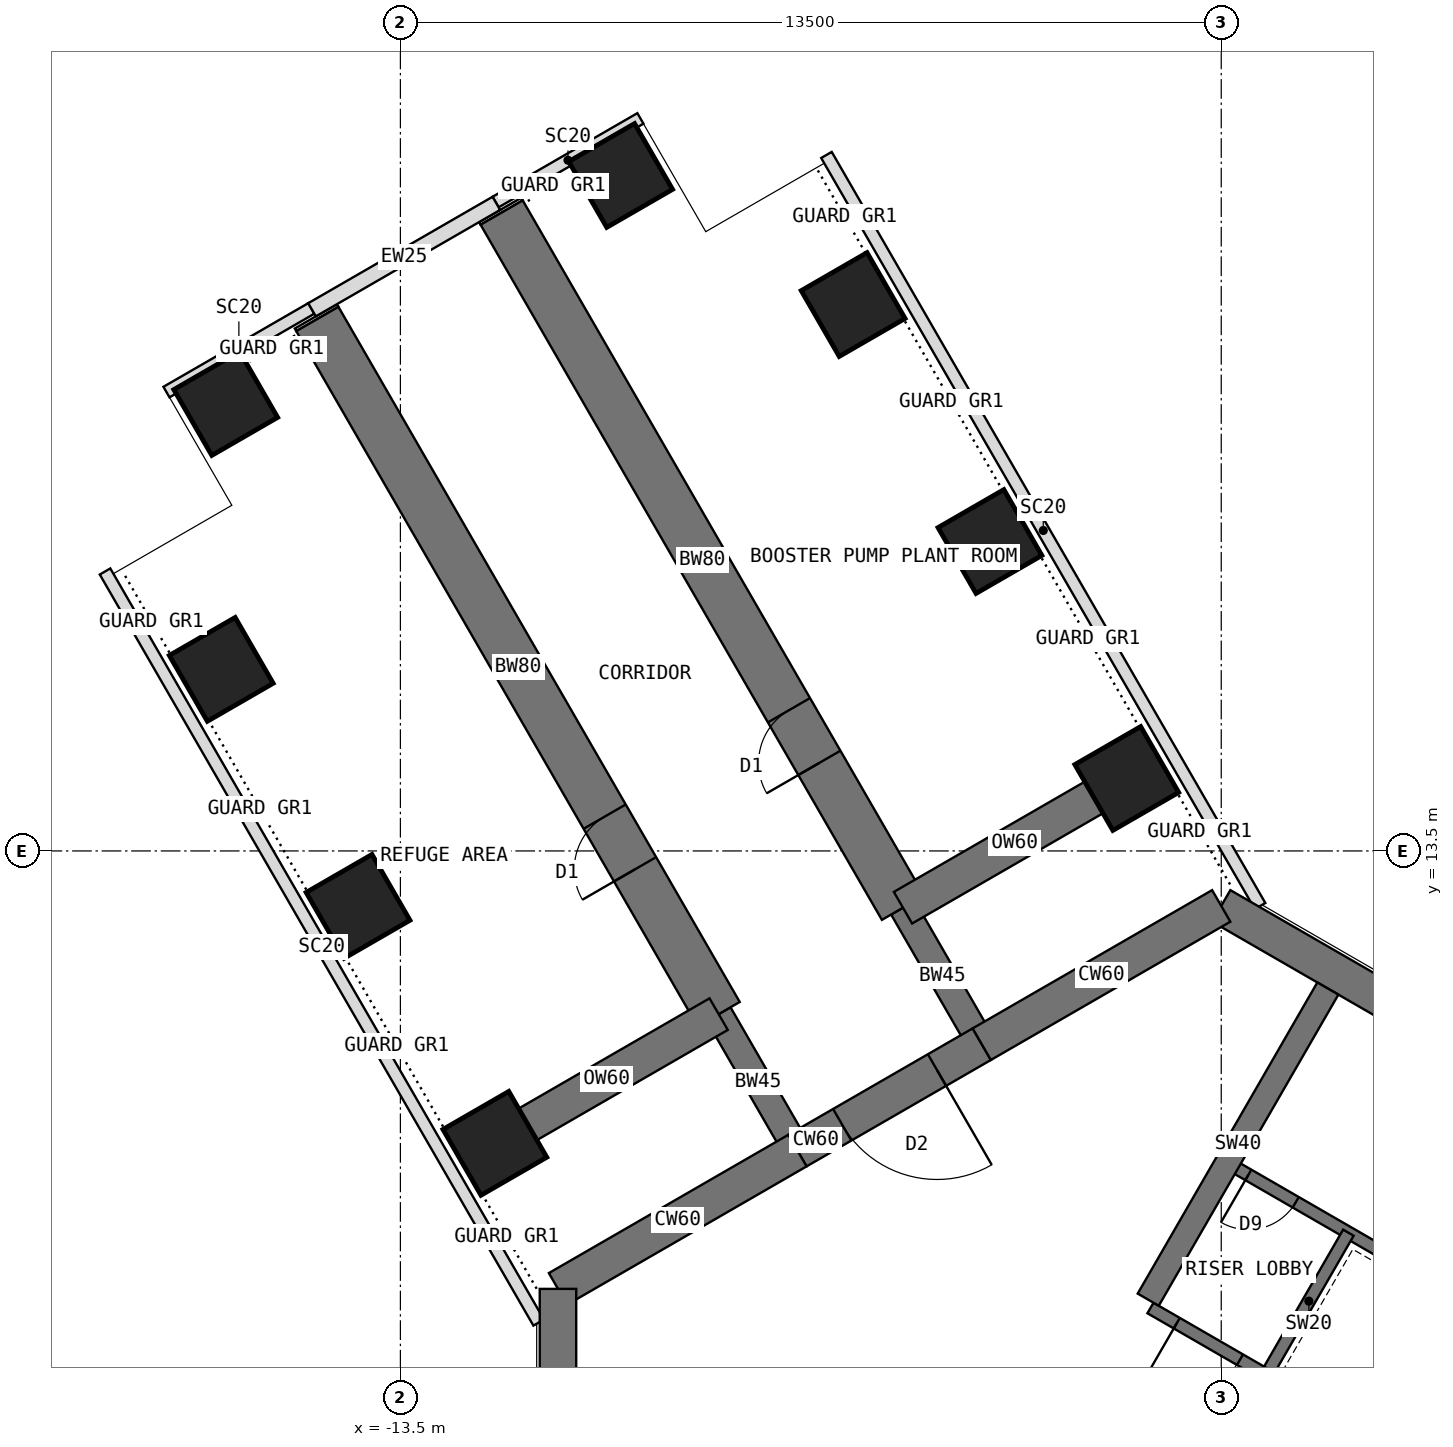
"""IFC4 building model, lengths in metres.
Left out: names, types, materials, properties, quantities, classifications, styles, units other than length and angle.
Written with IfcOpenShell. Run it as: python <this file> out.ifc"""

import sys

from ifc_helpers import new_model, si_unit, direction, frame, frame_2d, origin, origin_2d, place, context, subcontext, project, spatial, rectangle, extrude, element, fill, save


model = new_model("IFC4")
c1 = context("Model", 3, precision=1e-05, world=origin(), true_north=direction((0.0, 1.0)))
c2 = subcontext(c1, "Body", "Model", "MODEL_VIEW")
j1 = project(units=[si_unit("LENGTHUNIT", "METRE"), si_unit("PLANEANGLEUNIT", "RADIAN")], contexts=[c1])
p1 = place(None, origin())
s1 = spatial("IfcSite", under=j1, at=p1, CompositionType="ELEMENT")
p2 = place(p1, origin())
s2 = spatial("IfcBuilding", under=s1, at=p2, CompositionType="ELEMENT")
p3 = place(p2, frame((0.0, 0.0, 165.5)))
s3 = spatial("IfcBuildingStorey", under=s2, at=p3, CompositionType="ELEMENT", Elevation=165.5)
p4 = place(p3, frame((10.908, 6.298, 0.0), z_axis=(0.0, 0.0, 1.0), x_axis=(-0.866021940709, 0.500005998175, 0.0)))
e1 = element("IfcWall", 1, at=p4, inside=s3, PredefinedType="SHEAR", context=c2, shape_type="SweptSolid", body=[
    extrude(rectangle(XDim=12.596, YDim=0.6, at=frame_2d((6.298, 0.0))), origin(), (0.0, 0.0, 1.0), 5.0),
])
p5 = place(p3, frame((0.0, 12.596, 0.0), z_axis=(0.0, 0.0, 1.0), x_axis=(-0.866011268655, -0.500024481964, 0.0)))
e2 = element("IfcWall", 2, at=p5, inside=s3, PredefinedType="SHEAR", context=c2, shape_type="SweptSolid", body=[
    extrude(rectangle(XDim=4.548, YDim=0.6, at=frame_2d((2.274, 0.0))), origin(), (0.0, 0.0, 1.0), 5.0),
])
p6 = place(p3, frame((-3.939, 10.322, 0.0), z_axis=(0.0, 0.0, 1.0), x_axis=(-0.866019471182, -0.500010275428, 0.0)))
e3 = element("IfcWall", 3, at=p6, inside=s3, PredefinedType="SHEAR", context=c2, shape_type="SweptSolid", body=[
    extrude(rectangle(XDim=3.5, YDim=0.6, at=frame_2d((1.75, 0.0))), origin(), (0.0, 0.0, 1.0), 5.0),
])
p7 = place(p6, frame((0.85, 0.0, 0.0)))
e4 = element("IfcOpeningElement", 4, at=p7, cuts=e3, PredefinedType="OPENING", context=c2, shape_type="SweptSolid", body=[
    extrude(rectangle(XDim=1.8, YDim=2.1, at=frame_2d((0.9, 1.05))), frame((0.0, 0.31, 0.0), z_axis=(0.0, -1.0, 0.0), x_axis=(1.0, 0.0, 0.0)), (0.0, 0.0, 1.0), 0.62),
])
p8 = place(p3, frame((-6.97, 8.572, 0.0), z_axis=(0.0, 0.0, 1.0), x_axis=(-0.866034513004, -0.499984222037, 0.0)))
e5 = element("IfcWall", 5, at=p8, inside=s3, PredefinedType="SHEAR", context=c2, shape_type="SweptSolid", body=[
    extrude(rectangle(XDim=4.548, YDim=0.6, at=frame_2d((2.274, 0.0))), origin(), (0.0, 0.0, 1.0), 5.0),
])
p9 = place(p3, frame((-10.908, 6.298, 0.0), z_axis=(0.0, 0.0, 1.0), x_axis=(0.0, -1.0, 0.0)))
e6 = element("IfcWall", 6, at=p9, inside=s3, PredefinedType="SHEAR", context=c2, shape_type="SweptSolid", body=[
    extrude(rectangle(XDim=12.596, YDim=0.6, at=frame_2d((6.298, 0.0))), origin(), (0.0, 0.0, 1.0), 5.0),
])
p10 = place(p3, frame((-6.97, 8.572, 0.0), z_axis=(0.0, 0.0, 1.0), x_axis=(-0.499988811324, 0.866031863473, 0.0)))
e7 = element("IfcWall", 7, at=p10, inside=s3, PredefinedType="SHEAR", context=c2, shape_type="SweptSolid", body=[
    extrude(rectangle(XDim=2.592, YDim=0.45, at=frame_2d((1.296, 0.0))), origin(), (0.0, 0.0, 1.0), 5.0),
])
p11 = place(p3, frame((-8.266, 10.816, 0.0), z_axis=(0.0, 0.0, 1.0), x_axis=(-0.499996231654, 0.866027579429, 0.0)))
e8 = element("IfcWall", 8, at=p11, inside=s3, PredefinedType="SHEAR", context=c2, shape_type="SweptSolid", body=[
    extrude(rectangle(XDim=13.2, YDim=0.8, at=frame_2d((6.6, 0.0))), origin(), (0.0, 0.0, 1.0), 5.0),
])
p12 = place(p11, frame((2.75, 0.0, 0.0)))
e9 = element("IfcOpeningElement", 9, at=p12, cuts=e8, PredefinedType="OPENING", context=c2, shape_type="SweptSolid", body=[
    extrude(rectangle(XDim=1.0, YDim=2.1, at=frame_2d((0.5, 1.05))), frame((0.0, 0.41, 0.0), z_axis=(0.0, -1.0, 0.0), x_axis=(1.0, 0.0, 0.0)), (0.0, 0.0, 1.0), 0.82),
])
p13 = place(p3, frame((-3.939, 10.322, 0.0), z_axis=(0.0, 0.0, 1.0), x_axis=(-0.499918158782, 0.866072649678, 0.0)))
e10 = element("IfcWall", 10, at=p13, inside=s3, PredefinedType="SHEAR", context=c2, shape_type="SweptSolid", body=[
    extrude(rectangle(XDim=2.592, YDim=0.45, at=frame_2d((1.296, 0.0))), origin(), (0.0, 0.0, 1.0), 5.0),
])
p14 = place(p3, frame((-5.234, 12.566, 0.0), z_axis=(0.0, 0.0, 1.0), x_axis=(-0.500010103361, 0.866019570528, 0.0)))
e11 = element("IfcWall", 11, at=p14, inside=s3, PredefinedType="SHEAR", context=c2, shape_type="SweptSolid", body=[
    extrude(rectangle(XDim=13.2, YDim=0.8, at=frame_2d((6.6, 0.0))), origin(), (0.0, 0.0, 1.0), 5.0),
])
p15 = place(p14, frame((2.75, 0.0, 0.0)))
e12 = element("IfcOpeningElement", 12, at=p15, cuts=e11, PredefinedType="OPENING", context=c2, shape_type="SweptSolid", body=[
    extrude(rectangle(XDim=1.0, YDim=2.1, at=frame_2d((0.5, 1.05))), frame((0.0, 0.41, 0.0), z_axis=(0.0, -1.0, 0.0), x_axis=(1.0, 0.0, 0.0)), (0.0, 0.0, 1.0), 0.82),
])
for number, where, z_axis, x_axis in (
    (13, (-11.946, 8.691, 0.0), (0.0, 0.0, 1.0), (0.866, 0.5, 0.0)),
    (14, (-1.554, 14.691, 0.0), (0.0, 0.0, 1.0), (0.866, 0.5, 0.0)),
    (15, (-14.196, 12.588, 0.0), (0.0, 0.0, 1.0), (0.866, 0.5, 0.0)),
    (16, (-3.804, 18.588, 0.0), (0.0, 0.0, 1.0), (0.866, 0.5, 0.0)),
    (17, (-16.446, 16.486, 0.0), (0.0, 0.0, 1.0), (0.866, 0.5, 0.0)),
    (18, (-6.054, 22.486, 0.0), (0.0, 0.0, 1.0), (0.866, 0.5, 0.0)),
    (19, (-16.373, 20.858, 0.0), (0.0, 0.0, 1.0), (0.866, 0.5, 0.0)),
    (20, (-9.877, 24.608, 0.0), (0.0, 0.0, 1.0), (0.866, 0.5, 0.0)),
):
    element("IfcColumn", number, at=place(p3, frame(where, z_axis=z_axis, x_axis=x_axis)), inside=s3, PredefinedType="COLUMN", context=c2, shape_type="SweptSolid", body=[
        extrude(rectangle(XDim=1.25, YDim=1.25, at=origin_2d()), origin(), (0.0, 0.0, 1.0), 5.0),
    ])
for number, where, z_axis, x_axis in (
    (21, (-8.266, 10.816, 0.0), (0.0, 0.0, 1.0), (-0.866, -0.5, 0.0)),
    (22, (-5.234, 12.566, 0.0), (0.0, 0.0, 1.0), (0.866, 0.5, 0.0)),
):
    element("IfcWall", number, at=place(p3, frame(where, z_axis=z_axis, x_axis=x_axis)), inside=s3, PredefinedType="SHEAR", context=c2, shape_type="SweptSolid", body=[
        extrude(rectangle(XDim=4.25, YDim=0.6, at=frame_2d((2.125, 0.0))), origin(), (0.0, 0.0, 1.0), 5.0),
    ])
for number, where, z_axis, x_axis in (
    (23, (-11.226, 5.744, 0.0), (0.0, 0.0, 1.0), (-0.5, 0.866, 0.0)),
    (24, (-6.493, 24.946, 0.0), (0.0, 0.0, 1.0), (0.5, -0.866, 0.0)),
):
    element("IfcWall", number, at=place(p3, frame(where, z_axis=z_axis, x_axis=x_axis)), inside=s3, PredefinedType="USERDEFINED", context=c2, shape_type="SweptSolid", body=[
        extrude(rectangle(XDim=14.263, YDim=0.2, at=frame_2d((7.131, 0.0))), origin(), (0.0, 0.0, 1.0), 4.8),
    ])
p16 = place(p3, frame((-9.553, 25.546, 0.0), z_axis=(0.0, 0.0, 1.0), x_axis=(-0.866027397988, -0.499996545922, 0.0)))
e25 = element("IfcWall", 25, at=p16, inside=s3, PredefinedType="USERDEFINED", context=c2, shape_type="SweptSolid", body=[
    extrude(rectangle(XDim=2.75, YDim=0.2, at=frame_2d((1.375, 0.0))), origin(), (0.0, 0.0, 1.0), 4.8),
])
p17 = place(p3, frame((-11.922, 24.149, 0.0), z_axis=(0.0, 0.0, 1.0), x_axis=(-0.866036909293, -0.499980071345, 0.0)))
e26 = element("IfcWall", 26, at=p17, inside=s3, PredefinedType="STANDARD", context=c2, shape_type="SweptSolid", body=[
    extrude(rectangle(XDim=3.5, YDim=0.25, at=frame_2d((1.75, 0.0))), origin(), (0.0, 0.0, 1.0), 4.8),
])
p18 = place(p3, frame((-14.966, 22.421, 0.0), z_axis=(0.0, 0.0, 1.0), x_axis=(-0.866027397988, -0.499996545922, 0.0)))
e27 = element("IfcWall", 27, at=p18, inside=s3, PredefinedType="USERDEFINED", context=c2, shape_type="SweptSolid", body=[
    extrude(rectangle(XDim=2.75, YDim=0.2, at=frame_2d((1.375, 0.0))), origin(), (0.0, 0.0, 1.0), 4.8),
])
p19 = place(p3, frame((-14.865, 22.248, 0.0), z_axis=(0.0, 0.0, 1.0), x_axis=(-0.500844580232, 0.86553723574, 0.0)))
e28 = element("IfcWall", 28, at=p19, inside=s3, PredefinedType="PARTITIONING", context=c2, shape_type="SweptSolid", body=[
    extrude(rectangle(XDim=0.05, YDim=0.8, at=frame_2d((0.025, 0.0))), origin(), (0.0, 0.0, 1.0), 4.8),
])
p20 = place(p3, frame((-11.834, 23.998, 0.0), z_axis=(0.0, 0.0, 1.0), x_axis=(-0.497188445666, 0.867642581652, 0.0)))
e29 = element("IfcWall", 29, at=p20, inside=s3, PredefinedType="PARTITIONING", context=c2, shape_type="SweptSolid", body=[
    extrude(rectangle(XDim=0.05, YDim=0.8, at=frame_2d((0.025, 0.0))), origin(), (0.0, 0.0, 1.0), 4.8),
])
p21 = place(p3, frame((5.764, 1.984, 0.0), z_axis=(0.0, 0.0, 1.0), x_axis=(-0.866026010844, 0.49999894854, 0.0)))
e30 = element("IfcWall", 30, at=p21, inside=s3, PredefinedType="SHEAR", context=c2, shape_type="SweptSolid", body=[
    extrude(rectangle(XDim=8.0, YDim=0.2, at=frame_2d((4.0, 0.0))), origin(), (0.0, 0.0, 1.0), 5.0),
])
p22 = place(p21, frame((6.3, 0.0, 0.0)))
e31 = element("IfcOpeningElement", 31, at=p22, cuts=e30, PredefinedType="OPENING", context=c2, shape_type="SweptSolid", body=[
    extrude(rectangle(XDim=1.2, YDim=2.1, at=frame_2d((0.6, 1.05))), frame((0.0, 0.11, 0.0), z_axis=(0.0, -1.0, 0.0), x_axis=(1.0, 0.0, 0.0)), (0.0, 0.0, 1.0), 0.22),
])
p23 = place(p3, frame((0.791, 4.97, 0.0), z_axis=(0.0, 0.0, 1.0), x_axis=(0.499936506574, 0.866062058628, 0.0)))
e32 = element("IfcWall", 32, at=p23, inside=s3, PredefinedType="SHEAR", context=c2, shape_type="SweptSolid", body=[
    extrude(rectangle(XDim=2.6, YDim=0.2, at=frame_2d((1.3, 0.0))), origin(), (0.0, 0.0, 1.0), 5.0),
])
p24 = place(p3, frame((7.114, 4.322, 0.0), z_axis=(0.0, 0.0, 1.0), x_axis=(-0.866026010844, 0.49999894854, 0.0)))
e33 = element("IfcWall", 33, at=p24, inside=s3, PredefinedType="SHEAR", context=c2, shape_type="SweptSolid", body=[
    extrude(rectangle(XDim=8.0, YDim=0.2, at=frame_2d((4.0, 0.0))), origin(), (0.0, 0.0, 1.0), 5.0),
])
p25 = place(p24, frame((6.8, 0.0, 0.0)))
e34 = element("IfcOpeningElement", 34, at=p25, cuts=e33, PredefinedType="OPENING", context=c2, shape_type="SweptSolid", body=[
    extrude(rectangle(XDim=0.9, YDim=2.1, at=frame_2d((0.45, 1.05))), frame((0.0, 0.11, 0.0), z_axis=(0.0, -1.0, 0.0), x_axis=(1.0, 0.0, 0.0)), (0.0, 0.0, 1.0), 0.22),
])
p26 = place(p3, frame((-1.201, 6.12, 0.0), z_axis=(0.0, 0.0, 1.0), x_axis=(0.49999668571, 0.866027317282, 0.0)))
e35 = element("IfcWall", 35, at=p26, inside=s3, PredefinedType="SHEAR", context=c2, shape_type="SweptSolid", body=[
    extrude(rectangle(XDim=5.908, YDim=0.4, at=frame_2d((2.954, 0.0))), origin(), (0.0, 0.0, 1.0), 5.0),
])
p27 = place(p22, origin())
e36 = element("IfcDoor", 36, at=p27, inside=s3, OperationType="SINGLE_SWING_RIGHT", PredefinedType="DOOR", context=c2, shape_type="SweptSolid", body=[
    extrude(rectangle(XDim=1.2, YDim=2.1, at=frame_2d((0.6, 1.05))), frame((0.0, 0.025, 0.0), z_axis=(0.0, -1.0, 0.0), x_axis=(1.0, 0.0, 0.0)), (0.0, 0.0, 1.0), 0.05),
])
fill(e31, e36)
p28 = place(p25, origin())
e37 = element("IfcDoor", 37, at=p28, inside=s3, OperationType="SINGLE_SWING_RIGHT", PredefinedType="DOOR", context=c2, shape_type="SweptSolid", body=[
    extrude(rectangle(XDim=0.9, YDim=2.1, at=frame_2d((0.45, 1.05))), frame((0.0, 0.025, 0.0), z_axis=(0.0, -1.0, 0.0), x_axis=(1.0, 0.0, 0.0)), (0.0, 0.0, 1.0), 0.05),
])
fill(e34, e37)
p29 = place(p7, origin())
e38 = element("IfcDoor", 38, at=p29, inside=s3, OperationType="DOUBLE_DOOR_DOUBLE_SWING", PredefinedType="DOOR", context=c2, shape_type="SweptSolid", body=[
    extrude(rectangle(XDim=1.72, YDim=2.06, at=frame_2d((0.9, 1.03))), frame((0.0, 0.025, 0.0), z_axis=(0.0, -1.0, 0.0), x_axis=(1.0, 0.0, 0.0)), (0.0, 0.0, 1.0), 0.05),
    extrude(rectangle(XDim=0.04, YDim=2.1, at=frame_2d((0.02, 1.05))), frame((0.0, 0.3, 0.0), z_axis=(0.0, -1.0, 0.0), x_axis=(1.0, 0.0, 0.0)), (0.0, 0.0, 1.0), 0.6),
    extrude(rectangle(XDim=0.04, YDim=2.1, at=frame_2d((1.78, 1.05))), frame((0.0, 0.3, 0.0), z_axis=(0.0, -1.0, 0.0), x_axis=(1.0, 0.0, 0.0)), (0.0, 0.0, 1.0), 0.6),
    extrude(rectangle(XDim=1.72, YDim=0.04, at=frame_2d((0.9, 2.08))), frame((0.0, 0.3, 0.0), z_axis=(0.0, -1.0, 0.0), x_axis=(1.0, 0.0, 0.0)), (0.0, 0.0, 1.0), 0.6),
])
fill(e4, e38)
p30 = place(p12, origin())
e39 = element("IfcDoor", 39, at=p30, inside=s3, OperationType="SINGLE_SWING_LEFT", PredefinedType="DOOR", context=c2, shape_type="SweptSolid", body=[
    extrude(rectangle(XDim=0.92, YDim=2.06, at=frame_2d((0.5, 1.03))), frame((0.0, 0.025, 0.0), z_axis=(0.0, -1.0, 0.0), x_axis=(1.0, 0.0, 0.0)), (0.0, 0.0, 1.0), 0.05),
    extrude(rectangle(XDim=0.04, YDim=2.1, at=frame_2d((0.02, 1.05))), frame((0.0, 0.4, 0.0), z_axis=(0.0, -1.0, 0.0), x_axis=(1.0, 0.0, 0.0)), (0.0, 0.0, 1.0), 0.8),
    extrude(rectangle(XDim=0.04, YDim=2.1, at=frame_2d((0.98, 1.05))), frame((0.0, 0.4, 0.0), z_axis=(0.0, -1.0, 0.0), x_axis=(1.0, 0.0, 0.0)), (0.0, 0.0, 1.0), 0.8),
    extrude(rectangle(XDim=0.92, YDim=0.04, at=frame_2d((0.5, 2.08))), frame((0.0, 0.4, 0.0), z_axis=(0.0, -1.0, 0.0), x_axis=(1.0, 0.0, 0.0)), (0.0, 0.0, 1.0), 0.8),
])
fill(e9, e39)
p31 = place(p15, origin())
e40 = element("IfcDoor", 40, at=p31, inside=s3, OperationType="SINGLE_SWING_LEFT", PredefinedType="DOOR", context=c2, shape_type="SweptSolid", body=[
    extrude(rectangle(XDim=0.92, YDim=2.06, at=frame_2d((0.5, 1.03))), frame((0.0, 0.025, 0.0), z_axis=(0.0, -1.0, 0.0), x_axis=(1.0, 0.0, 0.0)), (0.0, 0.0, 1.0), 0.05),
    extrude(rectangle(XDim=0.04, YDim=2.1, at=frame_2d((0.02, 1.05))), frame((0.0, 0.4, 0.0), z_axis=(0.0, -1.0, 0.0), x_axis=(1.0, 0.0, 0.0)), (0.0, 0.0, 1.0), 0.8),
    extrude(rectangle(XDim=0.04, YDim=2.1, at=frame_2d((0.98, 1.05))), frame((0.0, 0.4, 0.0), z_axis=(0.0, -1.0, 0.0), x_axis=(1.0, 0.0, 0.0)), (0.0, 0.0, 1.0), 0.8),
    extrude(rectangle(XDim=0.92, YDim=0.04, at=frame_2d((0.5, 2.08))), frame((0.0, 0.4, 0.0), z_axis=(0.0, -1.0, 0.0), x_axis=(1.0, 0.0, 0.0)), (0.0, 0.0, 1.0), 0.8),
])
fill(e12, e40)
save(model, sys.argv[1])
